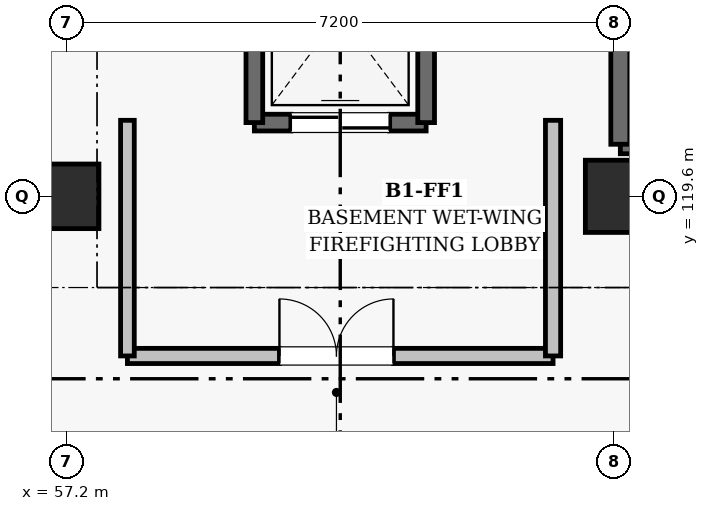
"""IFC4 building model, lengths in metres.
Left out: names, types, materials, properties, quantities, classifications, styles, units other than length and angle.
Written with IfcOpenShell. Run it as: python <this file> out.ifc"""

import sys

from ifc_helpers import new_model, si_unit, direction, frame, frame_2d, origin, origin_2d, place, context, subcontext, project, spatial, rectangle, extrude, element, fill, save


model = new_model("IFC4")
c1 = context("Model", 3, precision=1e-05, world=origin(), true_north=direction((0.0, 1.0)))
c2 = subcontext(c1, "Body", "Model", "MODEL_VIEW")
j1 = project(units=[si_unit("LENGTHUNIT", "METRE"), si_unit("PLANEANGLEUNIT", "RADIAN")], contexts=[c1])
p1 = place(None, origin())
s1 = spatial("IfcSite", under=j1, at=p1, CompositionType="ELEMENT")
p2 = place(p1, origin())
s2 = spatial("IfcBuilding", under=s1, at=p2, CompositionType="ELEMENT")
p3 = place(p2, frame((0.0, 0.0, -4.5)))
s3 = spatial("IfcBuildingStorey", under=s2, at=p3, CompositionType="ELEMENT", Elevation=-4.5)
p4 = place(p3, frame((57.2, 119.6, 0.0), z_axis=(0.0, 0.0, 1.0), x_axis=(1.0, 0.0, 0.0)))
e1 = element("IfcColumn", 1, at=p4, inside=s3, PredefinedType="COLUMN", context=c2, shape_type="SweptSolid", body=[
    extrude(rectangle(XDim=0.85, YDim=0.85, at=origin_2d()), origin(), (0.0, 0.0, 1.0), 4.5),
])
p5 = place(p3, frame((64.4, 119.6, 0.0), z_axis=(0.0, 0.0, 1.0), x_axis=(1.0, 0.0, 0.0)))
e2 = element("IfcColumn", 2, at=p5, inside=s3, PredefinedType="COLUMN", context=c2, shape_type="SweptSolid", body=[
    extrude(rectangle(XDim=0.75, YDim=0.95, at=origin_2d()), origin(), (0.0, 0.0, 1.0), 4.5),
])
p6 = place(p3, frame((64.485, 120.285, 0.0), z_axis=(0.0, 0.0, 1.0), x_axis=(1.0, 0.0, 0.0)))
e3 = element("IfcWall", 3, at=p6, inside=s3, PredefinedType="SHEAR", context=c2, shape_type="SweptSolid", body=[
    extrude(rectangle(XDim=10.63, YDim=0.25, at=frame_2d((5.315, 0.0))), origin(), (0.0, 0.0, 1.0), 4.175),
])
p7 = place(p6, frame((0.55, 0.0, 0.0)))
e4 = element("IfcOpeningElement", 4, at=p7, cuts=e3, PredefinedType="OPENING", context=c2, shape_type="SweptSolid", body=[
    extrude(rectangle(XDim=1.2, YDim=2.15, at=frame_2d((0.6, 1.075))), frame((0.0, 0.135, 0.0), z_axis=(0.0, -1.0, 0.0), x_axis=(1.0, 0.0, 0.0)), (0.0, 0.0, 1.0), 0.27),
])
p8 = place(p3, frame((64.485, 124.985, 0.0), z_axis=(0.0, 0.0, 1.0), x_axis=(0.0, -1.0, 0.0)))
e5 = element("IfcWall", 5, at=p8, inside=s3, PredefinedType="SHEAR", context=c2, shape_type="SweptSolid", body=[
    extrude(rectangle(XDim=4.7, YDim=0.25, at=frame_2d((2.35, 0.0))), origin(), (0.0, 0.0, 1.0), 4.175),
])
p9 = place(p3, frame((59.67, 120.57, 0.0), z_axis=(0.0, 0.0, 1.0), x_axis=(1.0, 0.0, 0.0)))
e6 = element("IfcWall", 6, at=p9, inside=s3, PredefinedType="SHEAR", context=c2, shape_type="SweptSolid", body=[
    extrude(rectangle(XDim=2.26, YDim=0.22, at=frame_2d((1.13, 0.0))), origin(), (0.0, 0.0, 1.0), 4.175),
])
p10 = place(p9, frame((0.48, 0.0, 0.0)))
e7 = element("IfcOpeningElement", 7, at=p10, cuts=e6, PredefinedType="OPENING", context=c2, shape_type="SweptSolid", body=[
    extrude(rectangle(XDim=1.3, YDim=2.2, at=frame_2d((0.65, 1.1))), frame((0.0, 0.12, 0.0), z_axis=(0.0, -1.0, 0.0), x_axis=(1.0, 0.0, 0.0)), (0.0, 0.0, 1.0), 0.24),
])
for number, where, z_axis, x_axis in (
    (8, (61.93, 120.57, 0.0), (0.0, 0.0, 1.0), (0.0, 1.0, 0.0)),
    (9, (59.67, 123.43, 0.0), (0.0, 0.0, 1.0), (0.0, -1.0, 0.0)),
):
    element("IfcWall", number, at=place(p3, frame(where, z_axis=z_axis, x_axis=x_axis)), inside=s3, PredefinedType="SHEAR", context=c2, shape_type="SweptSolid", body=[
        extrude(rectangle(XDim=2.86, YDim=0.22, at=frame_2d((1.43, 0.0))), origin(), (0.0, 0.0, 1.0), 4.175),
    ])
p11 = place(p3, frame((58.0, 117.5, 0.0), z_axis=(0.0, 0.0, 1.0), x_axis=(1.0, 0.0, 0.0)))
e10 = element("IfcWall", 10, at=p11, inside=s3, PredefinedType="SOLIDWALL", context=c2, shape_type="SweptSolid", body=[
    extrude(rectangle(XDim=5.6, YDim=0.2, at=frame_2d((2.8, 0.0))), origin(), (0.0, 0.0, 1.0), 3.54),
])
p12 = place(p11, frame((2.0, 0.0, 0.0)))
e11 = element("IfcOpeningElement", 11, at=p12, cuts=e10, PredefinedType="OPENING", context=c2, shape_type="SweptSolid", body=[
    extrude(rectangle(XDim=1.5, YDim=2.2, at=frame_2d((0.75, 1.1))), frame((0.0, 0.11, 0.0), z_axis=(0.0, -1.0, 0.0), x_axis=(1.0, 0.0, 0.0)), (0.0, 0.0, 1.0), 0.22),
])
p13 = place(p3, frame((58.0, 117.5, 0.0), z_axis=(0.0, 0.0, 1.0), x_axis=(0.0, 1.0, 0.0)))
e12 = element("IfcWall", 12, at=p13, inside=s3, PredefinedType="SOLIDWALL", context=c2, shape_type="SweptSolid", body=[
    extrude(rectangle(XDim=3.1, YDim=0.18, at=frame_2d((1.55, 0.0))), origin(), (0.0, 0.0, 1.0), 3.36),
])
p14 = place(p3, frame((63.6, 117.5, 0.0), z_axis=(0.0, 0.0, 1.0), x_axis=(0.0, 1.0, 0.0)))
e13 = element("IfcWall", 13, at=p14, inside=s3, PredefinedType="SOLIDWALL", context=c2, shape_type="SweptSolid", body=[
    extrude(rectangle(XDim=3.1, YDim=0.2, at=frame_2d((1.55, 0.0))), origin(), (0.0, 0.0, 1.0), 3.36),
])
p15 = place(p10, origin())
e14 = element("IfcDoor", 14, at=p15, inside=s3, OperationType="DOUBLE_DOOR_SLIDING", PredefinedType="DOOR", context=c2, shape_type="SweptSolid", body=[
    extrude(rectangle(XDim=1.3, YDim=2.2, at=frame_2d((0.65, 1.1))), frame((0.0, 0.025, 0.0), z_axis=(0.0, -1.0, 0.0), x_axis=(1.0, 0.0, 0.0)), (0.0, 0.0, 1.0), 0.05),
])
fill(e7, e14)
p16 = place(p12, origin())
e15 = element("IfcDoor", 15, at=p16, inside=s3, OperationType="DOUBLE_DOOR_SINGLE_SWING", PredefinedType="DOOR", context=c2, shape_type="SweptSolid", body=[
    extrude(rectangle(XDim=1.5, YDim=2.2, at=frame_2d((0.75, 1.1))), frame((0.0, 0.025, 0.0), z_axis=(0.0, -1.0, 0.0), x_axis=(1.0, 0.0, 0.0)), (0.0, 0.0, 1.0), 0.05),
])
fill(e11, e15)
save(model, sys.argv[1])
